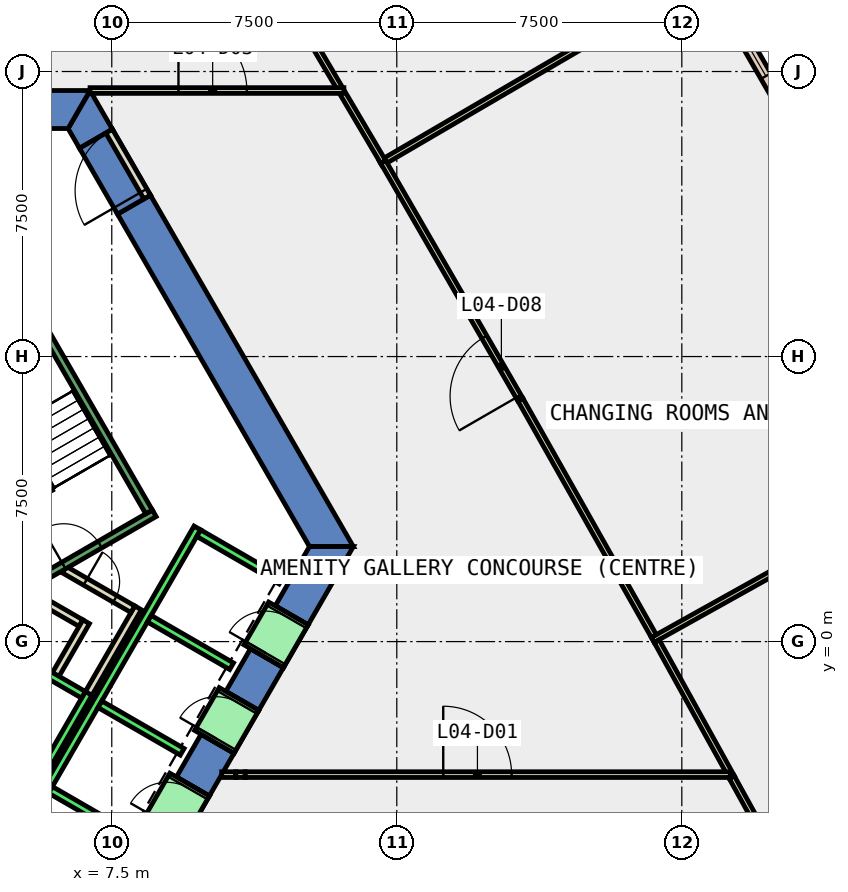
"""IFC4 building model, lengths in metres.
Left out: names, types, materials, properties, quantities, classifications, styles, units other than length and angle.
Written with IfcOpenShell. Run it as: python <this file> out.ifc"""

import sys

from ifc_helpers import new_model, si_unit, direction, frame, frame_2d, origin, place, context, subcontext, project, spatial, polyline, rectangle, outline, extrude, element, fill, save


model = new_model("IFC4")
c1 = context("Model", 3, precision=1e-05, world=origin(), true_north=direction((0.0, 1.0)))
c2 = subcontext(c1, "Body", "Model", "MODEL_VIEW")
j1 = project(units=[si_unit("LENGTHUNIT", "METRE"), si_unit("PLANEANGLEUNIT", "RADIAN")], contexts=[c1])
p1 = place(None, origin())
s1 = spatial("IfcSite", under=j1, at=p1, CompositionType="ELEMENT")
p2 = place(p1, origin())
s2 = spatial("IfcBuilding", under=s1, at=p2, CompositionType="ELEMENT")
p3 = place(p2, frame((0.0, 0.0, 25.0)))
s3 = spatial("IfcBuildingStorey", under=s2, at=p3, CompositionType="ELEMENT", Elevation=25.0)
p4 = place(p3, frame((0.0, 0.0, -0.45)))
e1 = element("IfcWall", 1, at=p4, inside=s3, PredefinedType="SHEAR", context=c2, shape_type="SweptSolid", body=[
    extrude(outline(polyline([(8.517, 11.748), (7.651, 11.248), (12.702, 2.5), (13.856, 2.5), (8.517, 11.748)])), origin(), (0.0, 0.0, 1.0), 5.0),
])
p5 = place(p3, frame((0.0, 0.0, -0.45)))
e2 = element("IfcWall", 2, at=p5, inside=s3, PredefinedType="SHEAR", context=c2, shape_type="SweptSolid", body=[
    extrude(outline(polyline([(6.651, 12.98), (7.517, 13.48), (6.928, 14.5), (6.351, 13.5), (6.651, 12.98)])), origin(), (0.0, 0.0, 1.0), 5.0),
])
p6 = place(p3, frame((0.0, 0.0, 3.6)))
e3 = element("IfcWall", 3, at=p6, inside=s3, PredefinedType="SHEAR", context=c2, shape_type="SweptSolid", body=[
    extrude(outline(polyline([(7.517, 13.48), (6.651, 12.98), (7.651, 11.248), (8.517, 11.748), (7.517, 13.48)])), origin(), (0.0, 0.0, 1.0), 0.95),
])
p7 = place(p3, frame((0.0, 0.0, -0.45)))
e4 = element("IfcWall", 4, at=p7, inside=s3, PredefinedType="SHEAR", context=c2, shape_type="SweptSolid", body=[
    extrude(outline(polyline([(4.55, 14.5), (4.55, 13.5), (6.351, 13.5), (6.928, 14.5), (4.55, 14.5)])), origin(), (0.0, 0.0, 1.0), 5.0),
])
p8 = place(p3, frame((0.0, 0.0, -0.45)))
e5 = element("IfcWall", 5, at=p8, inside=s3, PredefinedType="SHEAR", context=c2, shape_type="SweptSolid", body=[
    extrude(outline(polyline([(10.717, -2.937), (9.851, -2.437), (9.201, -3.563), (10.067, -4.063), (10.717, -2.937)])), origin(), (0.0, 0.0, 1.0), 5.0),
])
p9 = place(p3, frame((0.0, 0.0, -0.45)))
e6 = element("IfcWall", 6, at=p9, inside=s3, PredefinedType="SHEAR", context=c2, shape_type="SweptSolid", body=[
    extrude(outline(polyline([(12.017, -0.686), (11.151, -0.186), (10.501, -1.311), (11.367, -1.811), (12.017, -0.686)])), origin(), (0.0, 0.0, 1.0), 5.0),
])
p10 = place(p3, frame((0.0, 0.0, -0.45)))
e7 = element("IfcWall", 7, at=p10, inside=s3, PredefinedType="SHEAR", context=c2, shape_type="SweptSolid", body=[
    extrude(outline(polyline([(11.801, 0.94), (12.667, 0.44), (13.856, 2.5), (12.702, 2.5), (11.801, 0.94)])), origin(), (0.0, 0.0, 1.0), 5.0),
])
p11 = place(p3, frame((0.0, 0.0, 3.6)))
e8 = element("IfcWall", 8, at=p11, inside=s3, PredefinedType="SHEAR", context=c2, shape_type="SweptSolid", body=[
    extrude(outline(polyline([(10.067, -4.063), (9.201, -3.563), (8.551, -4.689), (9.417, -5.189), (10.067, -4.063)])), origin(), (0.0, 0.0, 1.0), 0.95),
])
p12 = place(p3, frame((0.0, 0.0, 3.6)))
e9 = element("IfcWall", 9, at=p12, inside=s3, PredefinedType="SHEAR", context=c2, shape_type="SweptSolid", body=[
    extrude(outline(polyline([(11.367, -1.811), (10.501, -1.311), (9.851, -2.437), (10.717, -2.937), (11.367, -1.811)])), origin(), (0.0, 0.0, 1.0), 0.95),
])
p13 = place(p3, frame((0.0, 0.0, 3.6)))
e10 = element("IfcWall", 10, at=p13, inside=s3, PredefinedType="SHEAR", context=c2, shape_type="SweptSolid", body=[
    extrude(outline(polyline([(12.667, 0.44), (11.801, 0.94), (11.151, -0.186), (12.017, -0.686), (12.667, 0.44)])), origin(), (0.0, 0.0, 1.0), 0.95),
])
p14 = place(p3, frame((26.507, 11.77, 0.0), z_axis=(0.0, 0.0, 1.0), x_axis=(-0.499939977436, 0.866060055055, 0.0)))
e11 = element("IfcWall", 11, at=p14, inside=s3, PredefinedType="STANDARD", context=c2, shape_type="SweptSolid", body=[
    extrude(rectangle(XDim=6.121, YDim=0.3, at=frame_2d((3.061, 0.0))), origin(), (0.0, 0.0, 1.0), 4.55),
])
p15 = place(p14, frame((0.53, 0.0, 1.0)))
e12 = element("IfcOpeningElement", 12, at=p15, cuts=e11, PredefinedType="OPENING", context=c2, shape_type="SweptSolid", body=[
    extrude(rectangle(XDim=2.0, YDim=3.2, at=frame_2d((1.0, 1.6))), frame((0.0, 0.16, 0.0), z_axis=(0.0, -1.0, 0.0), x_axis=(1.0, 0.0, 0.0)), (0.0, 0.0, 1.0), 0.32),
])
p16 = place(p14, frame((3.591, 0.0, 1.0)))
e13 = element("IfcOpeningElement", 13, at=p16, cuts=e11, PredefinedType="OPENING", context=c2, shape_type="SweptSolid", body=[
    extrude(rectangle(XDim=2.0, YDim=3.2, at=frame_2d((1.0, 1.6))), frame((0.0, 0.16, 0.0), z_axis=(0.0, -1.0, 0.0), x_axis=(1.0, 0.0, 0.0)), (0.0, 0.0, 1.0), 0.32),
])
p17 = place(p3, frame((5.499, 1.172, 0.0), z_axis=(0.0, 0.0, 1.0), x_axis=(0.866333505267, -0.499465972466, 0.0)))
e14 = element("IfcWall", 14, at=p17, inside=s3, PredefinedType="PARTITIONING", context=c2, shape_type="SweptSolid", body=[
    extrude(rectangle(XDim=1.374, YDim=0.2, at=frame_2d((0.687, 0.0))), origin(), (0.0, 0.0, 1.0), 4.55),
])
p18 = place(p3, frame((6.826, 0.522, 0.0), z_axis=(0.0, 0.0, 1.0), x_axis=(-0.500016722714, -0.866015748706, 0.0)))
e15 = element("IfcWall", 15, at=p18, inside=s3, PredefinedType="PARTITIONING", context=c2, shape_type="SweptSolid", body=[
    extrude(rectangle(XDim=1.7, YDim=0.2, at=frame_2d((0.85, 0.0))), origin(), (0.0, 0.0, 1.0), 4.55),
])
p19 = place(p3, frame((8.192, 0.888, 0.0), z_axis=(0.0, 0.0, 1.0), x_axis=(-0.499940625693, -0.866059680843, 0.0)))
e16 = element("IfcWall", 16, at=p19, inside=s3, PredefinedType="PARTITIONING", context=c2, shape_type="SweptSolid", body=[
    extrude(rectangle(XDim=2.68, YDim=0.2, at=frame_2d((1.34, 0.0))), origin(), (0.0, 0.0, 1.0), 4.55),
])
p20 = place(p3, frame((6.25, 1.894, 0.0), z_axis=(0.0, 0.0, 1.0), x_axis=(0.866043184279, -0.499969202016, 0.0)))
e17 = element("IfcWall", 17, at=p20, inside=s3, PredefinedType="PARTITIONING", context=c2, shape_type="SweptSolid", body=[
    extrude(rectangle(XDim=2.084, YDim=0.2, at=frame_2d((1.042, 0.0))), origin(), (0.0, 0.0, 1.0), 4.55),
])
p21 = place(p20, frame((0.642, 0.0, 0.0)))
e18 = element("IfcOpeningElement", 18, at=p21, cuts=e17, PredefinedType="OPENING", context=c2, shape_type="SweptSolid", body=[
    extrude(rectangle(XDim=0.9, YDim=2.1, at=frame_2d((0.45, 1.05))), frame((0.0, 0.11, 0.0), z_axis=(0.0, -1.0, 0.0), x_axis=(1.0, 0.0, 0.0)), (0.0, 0.0, 1.0), 0.22),
])
p22 = place(p3, frame((21.735, 0.044, 0.0), z_axis=(0.0, 0.0, 1.0), x_axis=(0.873420749931, 0.48696631669, 0.0)))
e19 = element("IfcWall", 19, at=p22, inside=s3, PredefinedType="PARTITIONING", context=c2, shape_type="SweptSolid", body=[
    extrude(rectangle(XDim=8.251, YDim=0.15, at=frame_2d((4.125, 0.0))), origin(), (0.0, 0.0, 1.0), 4.55),
])
p23 = place(p3, frame((23.813, -3.566, 0.0), z_axis=(0.0, 0.0, 1.0), x_axis=(0.483368016909, -0.875417249219, 0.0)))
e20 = element("IfcWall", 20, at=p23, inside=s3, PredefinedType="PARTITIONING", context=c2, shape_type="SweptSolid", body=[
    extrude(rectangle(XDim=3.064, YDim=0.15, at=frame_2d((1.532, 0.0))), origin(), (0.0, 0.0, 1.0), 4.55),
])
p24 = place(p3, frame((23.814, -3.565, 0.0), z_axis=(0.0, 0.0, 1.0), x_axis=(-0.483357057036, 0.875423300703, 0.0)))
e21 = element("IfcWall", 21, at=p24, inside=s3, PredefinedType="PARTITIONING", context=c2, shape_type="SweptSolid", body=[
    extrude(rectangle(XDim=4.084, YDim=0.15, at=frame_2d((2.042, 0.0))), origin(), (0.0, 0.0, 1.0), 4.55),
])
p25 = place(p3, frame((14.577, 12.584, 0.0), z_axis=(0.0, 0.0, 1.0), x_axis=(0.863499311522, 0.504350016358, 0.0)))
e22 = element("IfcWall", 22, at=p25, inside=s3, PredefinedType="PARTITIONING", context=c2, shape_type="SweptSolid", body=[
    extrude(rectangle(XDim=8.175, YDim=0.15, at=frame_2d((4.087, 0.0))), origin(), (0.0, 0.0, 1.0), 4.55),
])
p26 = place(p3, frame((21.764, 0.146, 0.0), z_axis=(0.0, 0.0, 1.0), x_axis=(-0.491550482328, 0.87084908183, 0.0)))
e23 = element("IfcWall", 23, at=p26, inside=s3, PredefinedType="PARTITIONING", context=c2, shape_type="SweptSolid", body=[
    extrude(rectangle(XDim=7.145, YDim=0.15, at=frame_2d((3.572, 0.0))), origin(), (0.0, 0.0, 1.0), 4.55),
])
p27 = place(p3, frame((18.252, 6.368, 0.0), z_axis=(0.0, 0.0, 1.0), x_axis=(-0.499899030103, 0.866083690934, 0.0)))
e24 = element("IfcWall", 24, at=p27, inside=s3, PredefinedType="PARTITIONING", context=c2, shape_type="SweptSolid", body=[
    extrude(rectangle(XDim=7.221, YDim=0.15, at=frame_2d((3.611, 0.0))), origin(), (0.0, 0.0, 1.0), 4.55),
])
p28 = place(p27, frame((0.1, 0.0, 0.0)))
e25 = element("IfcOpeningElement", 25, at=p28, cuts=e24, PredefinedType="OPENING", context=c2, shape_type="SweptSolid", body=[
    extrude(rectangle(XDim=1.8, YDim=2.1, at=frame_2d((0.9, 1.05))), frame((0.0, 0.085, 0.0), z_axis=(0.0, -1.0, 0.0), x_axis=(1.0, 0.0, 0.0)), (0.0, 0.0, 1.0), 0.17),
])
p29 = place(p3, frame((14.641, 12.623, 0.0), z_axis=(0.0, 0.0, 1.0), x_axis=(-0.508494775472, 0.861065074961, 0.0)))
e26 = element("IfcWall", 26, at=p29, inside=s3, PredefinedType="PARTITIONING", context=c2, shape_type="SweptSolid", body=[
    extrude(rectangle(XDim=2.104, YDim=0.15, at=frame_2d((1.052, 0.0))), origin(), (0.0, 0.0, 1.0), 4.55),
])
p30 = place(p3, frame((13.495, 14.565, 0.0), z_axis=(0.0, 0.0, 1.0), x_axis=(-0.508429753822, 0.861103469641, 0.0)))
e27 = element("IfcWall", 27, at=p30, inside=s3, PredefinedType="PARTITIONING", context=c2, shape_type="SweptSolid", body=[
    extrude(rectangle(XDim=4.97, YDim=0.15, at=frame_2d((2.485, 0.0))), origin(), (0.0, 0.0, 1.0), 4.55),
])
p31 = place(p3, frame((10.392, -3.5, 0.0), z_axis=(0.0, 0.0, 1.0), x_axis=(1.0, 0.0, 0.0)))
e28 = element("IfcWall", 28, at=p31, inside=s3, PredefinedType="PARTITIONING", context=c2, shape_type="SweptSolid", body=[
    extrude(rectangle(XDim=0.371, YDim=0.15, at=frame_2d((0.186, 0.0))), origin(), (0.0, 0.0, 1.0), 4.55),
])
p32 = place(p3, frame((6.928, 14.5, 0.0), z_axis=(0.0, 0.0, 1.0), x_axis=(1.0, 0.0, 0.0)))
e29 = element("IfcWall", 29, at=p32, inside=s3, PredefinedType="PARTITIONING", context=c2, shape_type="SweptSolid", body=[
    extrude(rectangle(XDim=6.68, YDim=0.15, at=frame_2d((3.34, 0.0))), origin(), (0.0, 0.0, 1.0), 4.55),
])
p33 = place(p32, frame((2.327, 0.0, 0.0)))
e30 = element("IfcOpeningElement", 30, at=p33, cuts=e29, PredefinedType="OPENING", context=c2, shape_type="SweptSolid", body=[
    extrude(rectangle(XDim=1.8, YDim=2.1, at=frame_2d((0.9, 1.05))), frame((0.0, 0.085, 0.0), z_axis=(0.0, -1.0, 0.0), x_axis=(1.0, 0.0, 0.0)), (0.0, 0.0, 1.0), 0.17),
])
p34 = place(p3, frame((8.43, 11.698, 0.0), z_axis=(0.0, 0.0, 1.0), x_axis=(-0.50002537861, 0.866010750942, 0.0)))
e31 = element("IfcWall", 31, at=p34, inside=s3, PredefinedType="PARTITIONING", context=c2, shape_type="SweptSolid", body=[
    extrude(rectangle(XDim=2.0, YDim=0.2, at=frame_2d((1.0, 0.0))), origin(), (0.0, 0.0, 1.0), 2.4),
])
p35 = place(p34, frame((0.19, 0.0, 0.0)))
e32 = element("IfcOpeningElement", 32, at=p35, cuts=e31, PredefinedType="OPENING", context=c2, shape_type="SweptSolid", body=[
    extrude(rectangle(XDim=1.8, YDim=2.1, at=frame_2d((0.9, 1.05))), frame((0.0, 0.11, 0.0), z_axis=(0.0, -1.0, 0.0), x_axis=(1.0, 0.0, 0.0)), (0.0, 0.0, 1.0), 0.22),
])
p36 = place(p3, frame((10.763, -3.5, 0.0), z_axis=(0.0, 0.0, 1.0), x_axis=(1.0, 0.0, 0.0)))
e33 = element("IfcWall", 33, at=p36, inside=s3, PredefinedType="PARTITIONING", context=c2, shape_type="SweptSolid", body=[
    extrude(rectangle(XDim=0.249, YDim=0.15, at=frame_2d((0.125, 0.0))), origin(), (0.0, 0.0, 1.0), 2.4),
])
p37 = place(p3, frame((11.012, -3.5, 0.0), z_axis=(0.0, 0.0, 1.0), x_axis=(1.0, 0.0, 0.0)))
e34 = element("IfcWall", 34, at=p37, inside=s3, PredefinedType="PARTITIONING", context=c2, shape_type="SweptSolid", body=[
    extrude(rectangle(XDim=12.765, YDim=0.15, at=frame_2d((6.383, 0.0))), origin(), (0.0, 0.0, 1.0), 4.55),
])
p38 = place(p37, frame((5.21, 0.0, 0.0)))
e35 = element("IfcOpeningElement", 35, at=p38, cuts=e34, PredefinedType="OPENING", context=c2, shape_type="SweptSolid", body=[
    extrude(rectangle(XDim=1.8, YDim=2.1, at=frame_2d((0.9, 1.05))), frame((0.0, 0.085, 0.0), z_axis=(0.0, -1.0, 0.0), x_axis=(1.0, 0.0, 0.0)), (0.0, 0.0, 1.0), 0.17),
])
p39 = place(p3, frame((5.492, -3.788, 0.0), z_axis=(0.0, 0.0, 1.0), x_axis=(0.500011755427, 0.866018616679, 0.0)))
e36 = element("IfcWall", 36, at=p39, inside=s3, PredefinedType="STANDARD", context=c2, shape_type="SweptSolid", body=[
    extrude(rectangle(XDim=2.8, YDim=0.2, at=frame_2d((1.4, 0.0))), origin(), (0.0, 0.0, 1.0), 4.55),
])
p40 = place(p3, frame((4.677, -0.2, 0.0), z_axis=(0.0, 0.0, 1.0), x_axis=(0.865973769406, -0.500089422704, 0.0)))
e37 = element("IfcWall", 37, at=p40, inside=s3, PredefinedType="STANDARD", context=c2, shape_type="SweptSolid", body=[
    extrude(rectangle(XDim=2.399, YDim=0.2, at=frame_2d((1.2, 0.0))), origin(), (0.0, 0.0, 1.0), 4.55),
])
p41 = place(p3, frame((4.451, -6.19, 0.0), z_axis=(0.0, 0.0, 1.0), x_axis=(0.50000090737, 0.866024879913, 0.0)))
e38 = element("IfcWall", 38, at=p41, inside=s3, PredefinedType="STANDARD", context=c2, shape_type="SweptSolid", body=[
    extrude(rectangle(XDim=10.6, YDim=0.2, at=frame_2d((5.3, 0.0))), origin(), (0.0, 0.0, 1.0), 4.55),
])
for number, where, z_axis, x_axis in (
    (39, (5.888, -3.902, 0.0), (0.0, 0.0, 1.0), (0.866, -0.5, 0.0)),
    (40, (7.188, -1.65, 0.0), (0.0, 0.0, 1.0), (0.866, -0.5, 0.0)),
    (41, (8.488, 0.602, 0.0), (0.0, 0.0, 1.0), (0.866, -0.5, 0.0)),
):
    element("IfcWall", number, at=place(p3, frame(where, z_axis=z_axis, x_axis=x_axis)), inside=s3, PredefinedType="STANDARD", context=c2, shape_type="SweptSolid", body=[
        extrude(rectangle(XDim=2.5, YDim=0.2, at=frame_2d((1.25, 0.0))), origin(), (0.0, 0.0, 1.0), 4.55),
    ])
p42 = place(p3, frame((9.788, 2.853, 0.0), z_axis=(0.0, 0.0, 1.0), x_axis=(0.865998541277, -0.500046524342, 0.0)))
e42 = element("IfcWall", 42, at=p42, inside=s3, PredefinedType="STANDARD", context=c2, shape_type="SweptSolid", body=[
    extrude(rectangle(XDim=2.5, YDim=0.2, at=frame_2d((1.25, 0.0))), origin(), (0.0, 0.0, 1.0), 4.55),
])
p43 = place(p3, frame((8.898, -4.889, 0.0), z_axis=(0.0, 0.0, 1.0), x_axis=(0.500036693733, 0.866004217611, 0.0)))
e43 = element("IfcWall", 43, at=p43, inside=s3, PredefinedType="STANDARD", context=c2, shape_type="SweptSolid", body=[
    extrude(rectangle(XDim=1.3, YDim=1.2, at=frame_2d((0.65, 0.0))), origin(), (0.0, 0.0, 1.0), 2.4),
])
p44 = place(p43, frame((0.1, 0.0, 0.0)))
e44 = element("IfcOpeningElement", 44, at=p44, cuts=e43, PredefinedType="OPENING", context=c2, shape_type="SweptSolid", body=[
    extrude(rectangle(XDim=1.1, YDim=2.3, at=frame_2d((0.55, 1.15))), frame((0.0, 0.61, 0.0), z_axis=(0.0, -1.0, 0.0), x_axis=(1.0, 0.0, 0.0)), (0.0, 0.0, 1.0), 1.22),
])
p45 = place(p3, frame((10.198, -2.637, 0.0), z_axis=(0.0, 0.0, 1.0), x_axis=(0.49989585183, 0.866085525409, 0.0)))
e45 = element("IfcWall", 45, at=p45, inside=s3, PredefinedType="STANDARD", context=c2, shape_type="SweptSolid", body=[
    extrude(rectangle(XDim=1.3, YDim=1.2, at=frame_2d((0.65, 0.0))), origin(), (0.0, 0.0, 1.0), 2.4),
])
p46 = place(p45, frame((0.1, 0.0, 0.0)))
e46 = element("IfcOpeningElement", 46, at=p46, cuts=e45, PredefinedType="OPENING", context=c2, shape_type="SweptSolid", body=[
    extrude(rectangle(XDim=1.1, YDim=2.3, at=frame_2d((0.55, 1.15))), frame((0.0, 0.61, 0.0), z_axis=(0.0, -1.0, 0.0), x_axis=(1.0, 0.0, 0.0)), (0.0, 0.0, 1.0), 1.22),
])
p47 = place(p3, frame((11.498, -0.385, 0.0), z_axis=(0.0, 0.0, 1.0), x_axis=(0.500221244143, 0.865897630733, 0.0)))
e47 = element("IfcWall", 47, at=p47, inside=s3, PredefinedType="STANDARD", context=c2, shape_type="SweptSolid", body=[
    extrude(rectangle(XDim=1.299, YDim=1.2, at=frame_2d((0.65, 0.0))), origin(), (0.0, 0.0, 1.0), 2.4),
])
p48 = place(p47, frame((0.1, 0.0, 0.0)))
e48 = element("IfcOpeningElement", 48, at=p48, cuts=e47, PredefinedType="OPENING", context=c2, shape_type="SweptSolid", body=[
    extrude(rectangle(XDim=1.1, YDim=2.3, at=frame_2d((0.55, 1.15))), frame((0.0, 0.61, 0.0), z_axis=(0.0, -1.0, 0.0), x_axis=(1.0, 0.0, 0.0)), (0.0, 0.0, 1.0), 1.22),
])
p49 = place(p3, frame((4.806, 1.176, 0.0), z_axis=(0.0, 0.0, 1.0), x_axis=(0.866059941101, 0.499940174841, 0.0)))
e49 = element("IfcWall", 49, at=p49, inside=s3, PredefinedType="STANDARD", context=c2, shape_type="SweptSolid", body=[
    extrude(rectangle(XDim=4.4, YDim=0.2, at=frame_2d((2.2, 0.0))), origin(), (0.0, 0.0, 1.0), 4.55),
])
p50 = place(p49, frame((1.65, 0.0, 0.0)))
e50 = element("IfcOpeningElement", 50, at=p50, cuts=e49, PredefinedType="OPENING", context=c2, shape_type="SweptSolid", body=[
    extrude(rectangle(XDim=1.1, YDim=2.2, at=frame_2d((0.55, 1.1))), frame((0.0, 0.11, 0.0), z_axis=(0.0, -1.0, 0.0), x_axis=(1.0, 0.0, 0.0)), (0.0, 0.0, 1.0), 0.22),
])
p51 = place(p3, frame((8.48, 3.412, 0.0), z_axis=(0.0, 0.0, 1.0), x_axis=(-0.499978703459, 0.866037698999, 0.0)))
e51 = element("IfcWall", 51, at=p51, inside=s3, PredefinedType="STANDARD", context=c2, shape_type="SweptSolid", body=[
    extrude(rectangle(XDim=6.9, YDim=0.2, at=frame_2d((3.45, 0.0))), origin(), (0.0, 0.0, 1.0), 4.55),
])
p52 = place(p16, origin())
e52 = element("IfcWindow", 52, at=p52, inside=s3, PartitioningType="SINGLE_PANEL", PredefinedType="WINDOW", context=c2, shape_type="SweptSolid", body=[
    extrude(rectangle(XDim=2.0, YDim=3.2, at=frame_2d((1.0, 1.6))), frame((0.0, 0.03, 0.0), z_axis=(0.0, -1.0, 0.0), x_axis=(1.0, 0.0, 0.0)), (0.0, 0.0, 1.0), 0.06),
])
fill(e13, e52)
p53 = place(p38, origin())
e53 = element("IfcDoor", 53, at=p53, inside=s3, OperationType="DOUBLE_DOOR_SINGLE_SWING", PredefinedType="DOOR", context=c2, shape_type="SweptSolid", body=[
    extrude(rectangle(XDim=1.8, YDim=2.1, at=frame_2d((0.9, 1.05))), frame((0.0, 0.025, 0.0), z_axis=(0.0, -1.0, 0.0), x_axis=(1.0, 0.0, 0.0)), (0.0, 0.0, 1.0), 0.05),
])
fill(e35, e53)
p54 = place(p33, origin())
e54 = element("IfcDoor", 54, at=p54, inside=s3, OperationType="DOUBLE_DOOR_SINGLE_SWING", PredefinedType="DOOR", context=c2, shape_type="SweptSolid", body=[
    extrude(rectangle(XDim=1.8, YDim=2.1, at=frame_2d((0.9, 1.05))), frame((0.0, 0.025, 0.0), z_axis=(0.0, -1.0, 0.0), x_axis=(1.0, 0.0, 0.0)), (0.0, 0.0, 1.0), 0.05),
])
fill(e30, e54)
p55 = place(p28, origin())
e55 = element("IfcDoor", 55, at=p55, inside=s3, OperationType="DOUBLE_DOOR_SINGLE_SWING", PredefinedType="DOOR", context=c2, shape_type="SweptSolid", body=[
    extrude(rectangle(XDim=1.8, YDim=2.1, at=frame_2d((0.9, 1.05))), frame((0.0, 0.025, 0.0), z_axis=(0.0, -1.0, 0.0), x_axis=(1.0, 0.0, 0.0)), (0.0, 0.0, 1.0), 0.05),
])
fill(e25, e55)
p56 = place(p21, origin())
e56 = element("IfcDoor", 56, at=p56, inside=s3, OperationType="SINGLE_SWING_LEFT", PredefinedType="DOOR", context=c2, shape_type="SweptSolid", body=[
    extrude(rectangle(XDim=0.9, YDim=2.1, at=frame_2d((0.45, 1.05))), frame((0.0, 0.025, 0.0), z_axis=(0.0, -1.0, 0.0), x_axis=(1.0, 0.0, 0.0)), (0.0, 0.0, 1.0), 0.05),
])
fill(e18, e56)
p57 = place(p35, origin())
e57 = element("IfcDoor", 57, at=p57, inside=s3, OperationType="DOUBLE_DOOR_SINGLE_SWING", PredefinedType="DOOR", context=c2, shape_type="SweptSolid", body=[
    extrude(rectangle(XDim=1.8, YDim=2.1, at=frame_2d((0.9, 1.05))), frame((0.0, 0.025, 0.0), z_axis=(0.0, -1.0, 0.0), x_axis=(1.0, 0.0, 0.0)), (0.0, 0.0, 1.0), 0.05),
])
fill(e32, e57)
p58 = place(p44, origin())
e58 = element("IfcDoor", 58, at=p58, inside=s3, OperationType="SLIDING_TO_LEFT", PredefinedType="DOOR", context=c2, shape_type="SweptSolid", body=[
    extrude(rectangle(XDim=1.1, YDim=2.3, at=frame_2d((0.55, 1.15))), frame((0.0, 0.025, 0.0), z_axis=(0.0, -1.0, 0.0), x_axis=(1.0, 0.0, 0.0)), (0.0, 0.0, 1.0), 0.05),
])
fill(e44, e58)
p59 = place(p46, origin())
e59 = element("IfcDoor", 59, at=p59, inside=s3, OperationType="SLIDING_TO_LEFT", PredefinedType="DOOR", context=c2, shape_type="SweptSolid", body=[
    extrude(rectangle(XDim=1.1, YDim=2.3, at=frame_2d((0.55, 1.15))), frame((0.0, 0.025, 0.0), z_axis=(0.0, -1.0, 0.0), x_axis=(1.0, 0.0, 0.0)), (0.0, 0.0, 1.0), 0.05),
])
fill(e46, e59)
p60 = place(p48, origin())
e60 = element("IfcDoor", 60, at=p60, inside=s3, OperationType="SLIDING_TO_LEFT", PredefinedType="DOOR", context=c2, shape_type="SweptSolid", body=[
    extrude(rectangle(XDim=1.1, YDim=2.3, at=frame_2d((0.55, 1.15))), frame((0.0, 0.025, 0.0), z_axis=(0.0, -1.0, 0.0), x_axis=(1.0, 0.0, 0.0)), (0.0, 0.0, 1.0), 0.05),
])
fill(e48, e60)
p61 = place(p50, origin())
e61 = element("IfcDoor", 61, at=p61, inside=s3, OperationType="SINGLE_SWING_LEFT", PredefinedType="DOOR", context=c2, shape_type="SweptSolid", body=[
    extrude(rectangle(XDim=1.1, YDim=2.2, at=frame_2d((0.55, 1.1))), frame((0.0, 0.025, 0.0), z_axis=(0.0, -1.0, 0.0), x_axis=(1.0, 0.0, 0.0)), (0.0, 0.0, 1.0), 0.05),
])
fill(e50, e61)
save(model, sys.argv[1])
